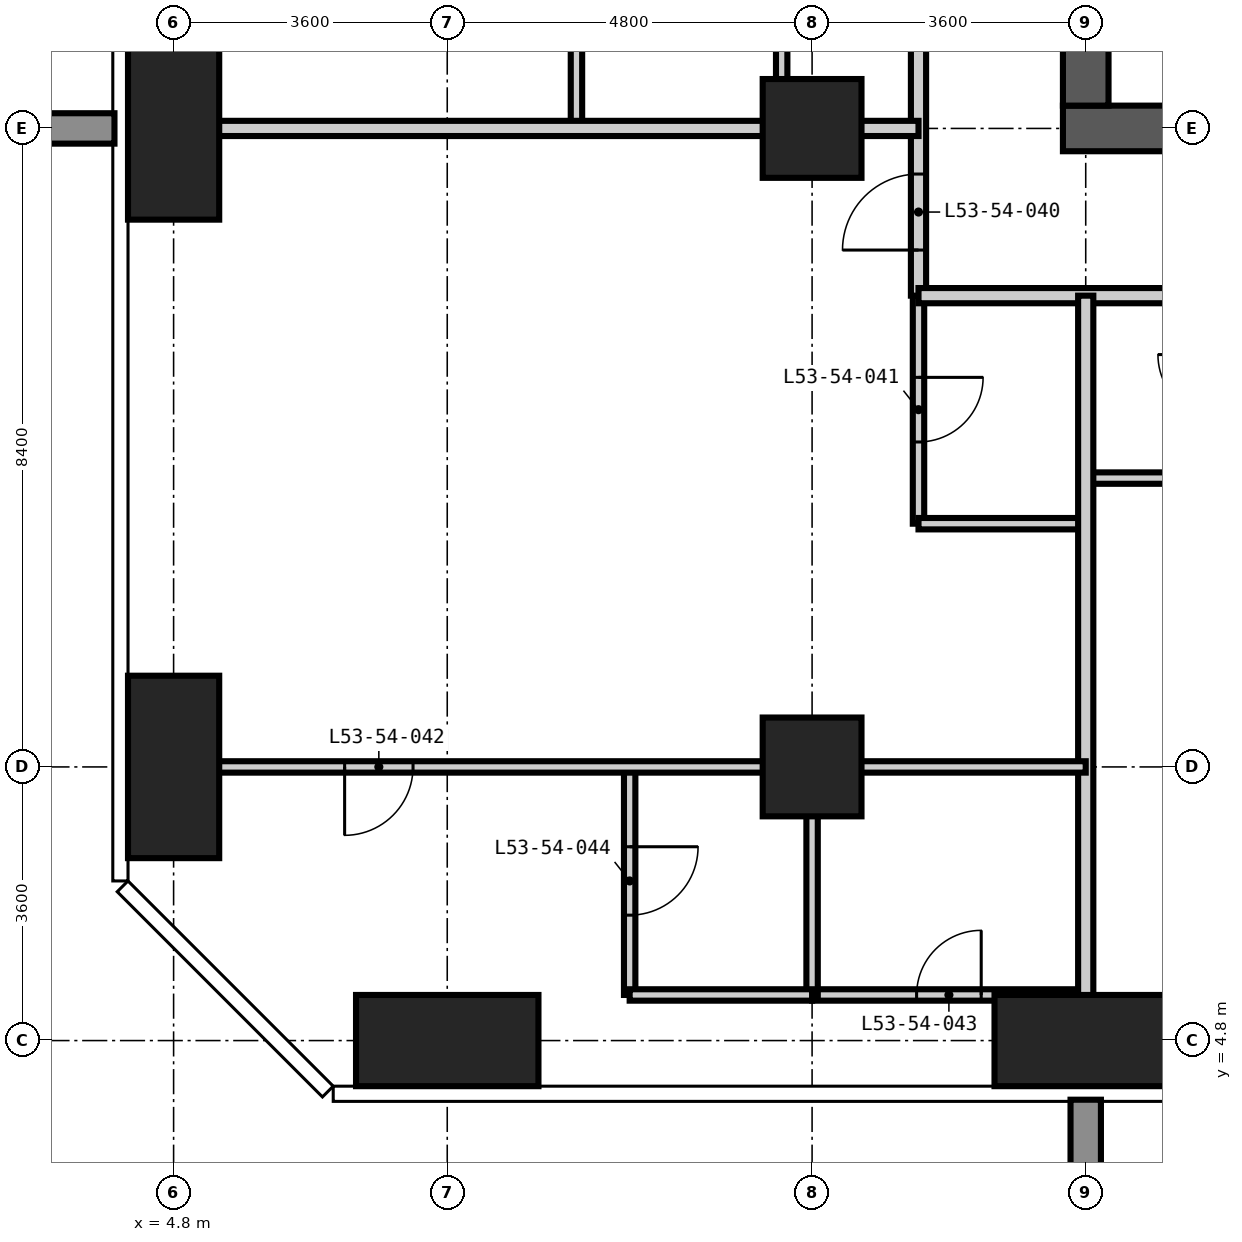
"""IFC4 building model, lengths in metres.
Left out: names, types, materials, properties, quantities, classifications, styles, units other than length and angle.
Written with IfcOpenShell. Run it as: python <this file> out.ifc"""

import sys

from ifc_helpers import new_model, si_unit, direction, frame, frame_2d, origin, origin_2d, place, context, subcontext, project, spatial, rectangle, extrude, element, fill, save


model = new_model("IFC4")
c1 = context("Model", 3, precision=1e-05, world=origin(), true_north=direction((0.0, 1.0)))
c2 = subcontext(c1, "Body", "Model", "MODEL_VIEW")
j1 = project(units=[si_unit("LENGTHUNIT", "METRE"), si_unit("PLANEANGLEUNIT", "RADIAN")], contexts=[c1])
p1 = place(None, origin())
s1 = spatial("IfcSite", under=j1, at=p1, CompositionType="ELEMENT")
p2 = place(p1, origin())
s2 = spatial("IfcBuilding", under=s1, at=p2, CompositionType="ELEMENT")
p3 = place(p2, frame((0.0, 0.0, 205.8)))
s3 = spatial("IfcBuildingStorey", under=s2, at=p3, CompositionType="ELEMENT", Elevation=205.8)
for number, where, z_axis, x_axis in (
    (1, (4.8, 8.4, -0.35), (0.0, 0.0, 1.0), (1.0, 0.0, 0.0)),
    (2, (4.8, 16.8, -0.35), (0.0, 0.0, 1.0), (1.0, 0.0, 0.0)),
):
    element("IfcColumn", number, at=place(p3, frame(where, z_axis=z_axis, x_axis=x_axis)), inside=s3, PredefinedType="COLUMN", context=c2, shape_type="SweptSolid", body=[
        extrude(rectangle(XDim=1.2, YDim=2.4, at=origin_2d()), origin(), (0.0, 0.0, 1.0), 3.6),
    ])
p4 = place(p3, frame((8.4, 4.8, -0.35), z_axis=(0.0, 0.0, 1.0), x_axis=(1.0, 0.0, 0.0)))
e3 = element("IfcColumn", 3, at=p4, inside=s3, PredefinedType="COLUMN", context=c2, shape_type="SweptSolid", body=[
    extrude(rectangle(XDim=2.4, YDim=1.2, at=origin_2d()), origin(), (0.0, 0.0, 1.0), 3.6),
])
for number, where, z_axis, x_axis in (
    (4, (13.2, 8.4, -0.35), (0.0, 0.0, 1.0), (1.0, 0.0, 0.0)),
    (5, (13.2, 16.8, -0.35), (0.0, 0.0, 1.0), (1.0, 0.0, 0.0)),
):
    element("IfcColumn", number, at=place(p3, frame(where, z_axis=z_axis, x_axis=x_axis)), inside=s3, PredefinedType="COLUMN", context=c2, shape_type="SweptSolid", body=[
        extrude(rectangle(XDim=1.3, YDim=1.3, at=origin_2d()), origin(), (0.0, 0.0, 1.0), 3.6),
    ])
p5 = place(p3, frame((16.8, 4.8, -0.35), z_axis=(0.0, 0.0, 1.0), x_axis=(1.0, 0.0, 0.0)))
e6 = element("IfcColumn", 6, at=p5, inside=s3, PredefinedType="COLUMN", context=c2, shape_type="SweptSolid", body=[
    extrude(rectangle(XDim=2.4, YDim=1.2, at=origin_2d()), origin(), (0.0, 0.0, 1.0), 3.6),
])
p6 = place(p3, frame((16.5, 16.8, -0.35), z_axis=(0.0, 0.0, 1.0), x_axis=(1.0, 0.0, 0.0)))
e7 = element("IfcWall", 7, at=p6, inside=s3, PredefinedType="SHEAR", context=c2, shape_type="SweptSolid", body=[
    extrude(rectangle(XDim=25.8, YDim=0.6, at=frame_2d((12.9, 0.0))), origin(), (0.0, 0.0, 1.0), 3.6),
])
p7 = place(p6, frame((12.4, 0.0, 0.35)))
e8 = element("IfcOpeningElement", 8, at=p7, cuts=e7, PredefinedType="OPENING", context=c2, shape_type="SweptSolid", body=[
    extrude(rectangle(XDim=1.0, YDim=2.1, at=frame_2d((0.5, 1.05))), frame((0.0, 0.31, 0.0), z_axis=(0.0, -1.0, 0.0), x_axis=(1.0, 0.0, 0.0)), (0.0, 0.0, 1.0), 0.62),
])
p8 = place(p6, frame((18.7, 0.0, 0.35)))
e9 = element("IfcOpeningElement", 9, at=p8, cuts=e7, PredefinedType="OPENING", context=c2, shape_type="SweptSolid", body=[
    extrude(rectangle(XDim=1.0, YDim=2.1, at=frame_2d((0.5, 1.05))), frame((0.0, 0.31, 0.0), z_axis=(0.0, -1.0, 0.0), x_axis=(1.0, 0.0, 0.0)), (0.0, 0.0, 1.0), 0.62),
])
p9 = place(p3, frame((16.8, 41.7, -0.35), z_axis=(0.0, 0.0, 1.0), x_axis=(0.0, -1.0, 0.0)))
e10 = element("IfcWall", 10, at=p9, inside=s3, PredefinedType="SHEAR", context=c2, shape_type="SweptSolid", body=[
    extrude(rectangle(XDim=24.6, YDim=0.6, at=frame_2d((12.3, 0.0))), origin(), (0.0, 0.0, 1.0), 3.6),
])
p10 = place(p9, frame((11.4, 0.0, 0.35)))
e11 = element("IfcOpeningElement", 11, at=p10, cuts=e10, PredefinedType="OPENING", context=c2, shape_type="SweptSolid", body=[
    extrude(rectangle(XDim=1.8, YDim=2.2, at=frame_2d((0.9, 1.1))), frame((0.0, 0.31, 0.0), z_axis=(0.0, -1.0, 0.0), x_axis=(1.0, 0.0, 0.0)), (0.0, 0.0, 1.0), 0.62),
])
p11 = place(p9, frame((20.2, 0.0, 0.35)))
e12 = element("IfcOpeningElement", 12, at=p11, cuts=e10, PredefinedType="OPENING", context=c2, shape_type="SweptSolid", body=[
    extrude(rectangle(XDim=1.0, YDim=2.1, at=frame_2d((0.5, 1.05))), frame((0.0, 0.31, 0.0), z_axis=(0.0, -1.0, 0.0), x_axis=(1.0, 0.0, 0.0)), (0.0, 0.0, 1.0), 0.62),
])
p12 = place(p9, frame((5.5, 0.0, 0.35)))
e13 = element("IfcOpeningElement", 13, at=p12, cuts=e10, PredefinedType="OPENING", context=c2, shape_type="SweptSolid", body=[
    extrude(rectangle(XDim=1.0, YDim=2.1, at=frame_2d((0.5, 1.05))), frame((0.0, 0.31, 0.0), z_axis=(0.0, -1.0, 0.0), x_axis=(1.0, 0.0, 0.0)), (0.0, 0.0, 1.0), 0.62),
])
for number, where, z_axis, x_axis in (
    (14, (10.1, 16.8, 0.0), (0.0, 0.0, 1.0), (0.0, 1.0, 0.0)),
    (15, (12.8, 16.8, 0.0), (0.0, 0.0, 1.0), (0.0, 1.0, 0.0)),
):
    element("IfcWall", number, at=place(p3, frame(where, z_axis=z_axis, x_axis=x_axis)), inside=s3, PredefinedType="PARTITIONING", context=c2, shape_type="SweptSolid", body=[
        extrude(rectangle(XDim=2.7, YDim=0.15, at=frame_2d((1.35, 0.0))), origin(), (0.0, 0.0, 1.0), 3.25),
    ])
p13 = place(p3, frame((14.6, 11.6, 0.0), z_axis=(0.0, 0.0, 1.0), x_axis=(0.0, 1.0, 0.0)))
e16 = element("IfcWall", 16, at=p13, inside=s3, PredefinedType="PARTITIONING", context=c2, shape_type="SweptSolid", body=[
    extrude(rectangle(XDim=3.0, YDim=0.15, at=frame_2d((1.5, 0.0))), origin(), (0.0, 0.0, 1.0), 3.25),
])
p14 = place(p13, frame((1.075, 0.0, 0.0)))
e17 = element("IfcOpeningElement", 17, at=p14, cuts=e16, PredefinedType="OPENING", context=c2, shape_type="SweptSolid", body=[
    extrude(rectangle(XDim=0.85, YDim=2.1, at=frame_2d((0.425, 1.05))), frame((0.0, 0.085, 0.0), z_axis=(0.0, -1.0, 0.0), x_axis=(1.0, 0.0, 0.0)), (0.0, 0.0, 1.0), 0.17),
])
p15 = place(p3, frame((13.2, 5.4, 0.0), z_axis=(0.0, 0.0, 1.0), x_axis=(1.0, 0.0, 0.0)))
e18 = element("IfcWall", 18, at=p15, inside=s3, PredefinedType="PARTITIONING", context=c2, shape_type="SweptSolid", body=[
    extrude(rectangle(XDim=3.6, YDim=0.15, at=frame_2d((1.8, 0.0))), origin(), (0.0, 0.0, 1.0), 3.25),
])
p16 = place(p15, frame((1.375, 0.0, 0.0)))
e19 = element("IfcOpeningElement", 19, at=p16, cuts=e18, PredefinedType="OPENING", context=c2, shape_type="SweptSolid", body=[
    extrude(rectangle(XDim=0.85, YDim=2.1, at=frame_2d((0.425, 1.05))), frame((0.0, 0.085, 0.0), z_axis=(0.0, -1.0, 0.0), x_axis=(1.0, 0.0, 0.0)), (0.0, 0.0, 1.0), 0.17),
])
p17 = place(p3, frame((14.6, 11.6, 0.0), z_axis=(0.0, 0.0, 1.0), x_axis=(1.0, 0.0, 0.0)))
e20 = element("IfcWall", 20, at=p17, inside=s3, PredefinedType="PARTITIONING", context=c2, shape_type="SweptSolid", body=[
    extrude(rectangle(XDim=2.2, YDim=0.15, at=frame_2d((1.1, 0.0))), origin(), (0.0, 0.0, 1.0), 3.25),
])
p18 = place(p3, frame((16.8, 12.2, 0.0), z_axis=(0.0, 0.0, 1.0), x_axis=(1.0, 0.0, 0.0)))
e21 = element("IfcWall", 21, at=p18, inside=s3, PredefinedType="PARTITIONING", context=c2, shape_type="SweptSolid", body=[
    extrude(rectangle(XDim=1.8, YDim=0.15, at=frame_2d((0.9, 0.0))), origin(), (0.0, 0.0, 1.0), 3.25),
])
p19 = place(p3, frame((14.6, 14.6, 0.0), z_axis=(0.0, 0.0, 1.0), x_axis=(0.0, 1.0, 0.0)))
e22 = element("IfcWall", 22, at=p19, inside=s3, PredefinedType="PARTITIONING", context=c2, shape_type="SweptSolid", body=[
    extrude(rectangle(XDim=13.0, YDim=0.2, at=frame_2d((6.5, 0.0))), origin(), (0.0, 0.0, 1.0), 3.25),
])
p20 = place(p19, frame((3.8, 0.0, 0.0)))
e23 = element("IfcOpeningElement", 23, at=p20, cuts=e22, PredefinedType="OPENING", context=c2, shape_type="SweptSolid", body=[
    extrude(rectangle(XDim=1.0, YDim=2.2, at=frame_2d((0.5, 1.1))), frame((0.0, 0.11, 0.0), z_axis=(0.0, -1.0, 0.0), x_axis=(1.0, 0.0, 0.0)), (0.0, 0.0, 1.0), 0.22),
])
p21 = place(p19, frame((8.0, 0.0, 0.0)))
e24 = element("IfcOpeningElement", 24, at=p21, cuts=e22, PredefinedType="OPENING", context=c2, shape_type="SweptSolid", body=[
    extrude(rectangle(XDim=1.0, YDim=2.2, at=frame_2d((0.5, 1.1))), frame((0.0, 0.11, 0.0), z_axis=(0.0, -1.0, 0.0), x_axis=(1.0, 0.0, 0.0)), (0.0, 0.0, 1.0), 0.22),
])
p22 = place(p19, frame((0.6, 0.0, 0.0)))
e25 = element("IfcOpeningElement", 25, at=p22, cuts=e22, PredefinedType="OPENING", context=c2, shape_type="SweptSolid", body=[
    extrude(rectangle(XDim=1.0, YDim=2.2, at=frame_2d((0.5, 1.1))), frame((0.0, 0.11, 0.0), z_axis=(0.0, -1.0, 0.0), x_axis=(1.0, 0.0, 0.0)), (0.0, 0.0, 1.0), 0.22),
])
p23 = place(p3, frame((44.8, 14.6, 0.0), z_axis=(0.0, 0.0, 1.0), x_axis=(-1.0, 0.0, 0.0)))
e26 = element("IfcWall", 26, at=p23, inside=s3, PredefinedType="PARTITIONING", context=c2, shape_type="SweptSolid", body=[
    extrude(rectangle(XDim=30.2, YDim=0.2, at=frame_2d((15.1, 0.0))), origin(), (0.0, 0.0, 1.0), 3.25),
])
p24 = place(p23, frame((24.5, 0.0, 0.0)))
e27 = element("IfcOpeningElement", 27, at=p24, cuts=e26, PredefinedType="OPENING", context=c2, shape_type="SweptSolid", body=[
    extrude(rectangle(XDim=1.0, YDim=2.2, at=frame_2d((0.5, 1.1))), frame((0.0, 0.11, 0.0), z_axis=(0.0, -1.0, 0.0), x_axis=(1.0, 0.0, 0.0)), (0.0, 0.0, 1.0), 0.22),
])
p25 = place(p23, frame((12.8, 0.0, 0.0)))
e28 = element("IfcOpeningElement", 28, at=p25, cuts=e26, PredefinedType="OPENING", context=c2, shape_type="SweptSolid", body=[
    extrude(rectangle(XDim=1.0, YDim=2.2, at=frame_2d((0.5, 1.1))), frame((0.0, 0.11, 0.0), z_axis=(0.0, -1.0, 0.0), x_axis=(1.0, 0.0, 0.0)), (0.0, 0.0, 1.0), 0.22),
])
p26 = place(p23, frame((6.5, 0.0, 0.0)))
e29 = element("IfcOpeningElement", 29, at=p26, cuts=e26, PredefinedType="OPENING", context=c2, shape_type="SweptSolid", body=[
    extrude(rectangle(XDim=1.0, YDim=2.2, at=frame_2d((0.5, 1.1))), frame((0.0, 0.11, 0.0), z_axis=(0.0, -1.0, 0.0), x_axis=(1.0, 0.0, 0.0)), (0.0, 0.0, 1.0), 0.22),
])
for number, where, z_axis, x_axis in (
    (30, (16.8, 4.182, 0.0), (0.0, 0.0, 1.0), (0.0, 1.0, 0.0)),
    (31, (4.182, 16.8, 0.0), (0.0, 0.0, 1.0), (1.0, 0.0, 0.0)),
):
    element("IfcWall", number, at=place(p3, frame(where, z_axis=z_axis, x_axis=x_axis)), inside=s3, PredefinedType="PARTITIONING", context=c2, shape_type="SweptSolid", body=[
        extrude(rectangle(XDim=10.418, YDim=0.2, at=frame_2d((5.209, 0.0))), origin(), (0.0, 0.0, 1.0), 3.25),
    ])
p27 = place(p3, frame((10.8, 5.4, 0.0), z_axis=(0.0, 0.0, 1.0), x_axis=(0.0, 1.0, 0.0)))
e32 = element("IfcWall", 32, at=p27, inside=s3, PredefinedType="PARTITIONING", context=c2, shape_type="SweptSolid", body=[
    extrude(rectangle(XDim=3.0, YDim=0.15, at=frame_2d((1.5, 0.0))), origin(), (0.0, 0.0, 1.0), 3.25),
])
p28 = place(p27, frame((1.05, 0.0, 0.0)))
e33 = element("IfcOpeningElement", 33, at=p28, cuts=e32, PredefinedType="OPENING", context=c2, shape_type="SweptSolid", body=[
    extrude(rectangle(XDim=0.9, YDim=2.1, at=frame_2d((0.45, 1.05))), frame((0.0, 0.085, 0.0), z_axis=(0.0, -1.0, 0.0), x_axis=(1.0, 0.0, 0.0)), (0.0, 0.0, 1.0), 0.17),
])
p29 = place(p3, frame((13.2, 5.4, 0.0), z_axis=(0.0, 0.0, 1.0), x_axis=(0.0, 1.0, 0.0)))
e34 = element("IfcWall", 34, at=p29, inside=s3, PredefinedType="PARTITIONING", context=c2, shape_type="SweptSolid", body=[
    extrude(rectangle(XDim=3.0, YDim=0.15, at=frame_2d((1.5, 0.0))), origin(), (0.0, 0.0, 1.0), 3.25),
])
p30 = place(p3, frame((10.8, 5.4, 0.0), z_axis=(0.0, 0.0, 1.0), x_axis=(1.0, 0.0, 0.0)))
e35 = element("IfcWall", 35, at=p30, inside=s3, PredefinedType="PARTITIONING", context=c2, shape_type="SweptSolid", body=[
    extrude(rectangle(XDim=2.4, YDim=0.15, at=frame_2d((1.2, 0.0))), origin(), (0.0, 0.0, 1.0), 3.25),
])
p31 = place(p3, frame((4.182, 8.4, 0.0), z_axis=(0.0, 0.0, 1.0), x_axis=(1.0, 0.0, 0.0)))
e36 = element("IfcWall", 36, at=p31, inside=s3, PredefinedType="PARTITIONING", context=c2, shape_type="SweptSolid", body=[
    extrude(rectangle(XDim=12.618, YDim=0.15, at=frame_2d((6.309, 0.0))), origin(), (0.0, 0.0, 1.0), 3.25),
])
p32 = place(p31, frame((2.868, 0.0, 0.0)))
e37 = element("IfcOpeningElement", 37, at=p32, cuts=e36, PredefinedType="OPENING", context=c2, shape_type="SweptSolid", body=[
    extrude(rectangle(XDim=0.9, YDim=2.1, at=frame_2d((0.45, 1.05))), frame((0.0, 0.085, 0.0), z_axis=(0.0, -1.0, 0.0), x_axis=(1.0, 0.0, 0.0)), (0.0, 0.0, 1.0), 0.17),
])
p33 = place(p22, origin())
e38 = element("IfcDoor", 38, at=p33, inside=s3, OperationType="SINGLE_SWING_LEFT", PredefinedType="DOOR", context=c2, shape_type="SweptSolid", body=[
    extrude(rectangle(XDim=1.0, YDim=2.2, at=frame_2d((0.5, 1.1))), frame((0.0, 0.025, 0.0), z_axis=(0.0, -1.0, 0.0), x_axis=(1.0, 0.0, 0.0)), (0.0, 0.0, 1.0), 0.05),
])
fill(e25, e38)
p34 = place(p14, frame((0.85, 0.0, 0.0), z_axis=(0.0, 0.0, 1.0), x_axis=(-1.0, 0.0, 0.0)))
e39 = element("IfcDoor", 39, at=p34, inside=s3, OperationType="SINGLE_SWING_LEFT", PredefinedType="DOOR", context=c2, shape_type="SweptSolid", body=[
    extrude(rectangle(XDim=0.85, YDim=2.1, at=frame_2d((0.425, 1.05))), frame((0.0, 0.025, 0.0), z_axis=(0.0, -1.0, 0.0), x_axis=(1.0, 0.0, 0.0)), (0.0, 0.0, 1.0), 0.05),
])
fill(e17, e39)
p35 = place(p32, frame((0.9, 0.0, 0.0), z_axis=(0.0, 0.0, 1.0), x_axis=(-1.0, 0.0, 0.0)))
e40 = element("IfcDoor", 40, at=p35, inside=s3, OperationType="SINGLE_SWING_RIGHT", PredefinedType="DOOR", context=c2, shape_type="SweptSolid", body=[
    extrude(rectangle(XDim=0.9, YDim=2.1, at=frame_2d((0.45, 1.05))), frame((0.0, 0.025, 0.0), z_axis=(0.0, -1.0, 0.0), x_axis=(1.0, 0.0, 0.0)), (0.0, 0.0, 1.0), 0.05),
])
fill(e37, e40)
p36 = place(p16, origin())
e41 = element("IfcDoor", 41, at=p36, inside=s3, OperationType="SINGLE_SWING_RIGHT", PredefinedType="DOOR", context=c2, shape_type="SweptSolid", body=[
    extrude(rectangle(XDim=0.85, YDim=2.1, at=frame_2d((0.425, 1.05))), frame((0.0, 0.025, 0.0), z_axis=(0.0, -1.0, 0.0), x_axis=(1.0, 0.0, 0.0)), (0.0, 0.0, 1.0), 0.05),
])
fill(e19, e41)
p37 = place(p28, frame((0.9, 0.0, 0.0), z_axis=(0.0, 0.0, 1.0), x_axis=(-1.0, 0.0, 0.0)))
e42 = element("IfcDoor", 42, at=p37, inside=s3, OperationType="SINGLE_SWING_LEFT", PredefinedType="DOOR", context=c2, shape_type="SweptSolid", body=[
    extrude(rectangle(XDim=0.9, YDim=2.1, at=frame_2d((0.45, 1.05))), frame((0.0, 0.025, 0.0), z_axis=(0.0, -1.0, 0.0), x_axis=(1.0, 0.0, 0.0)), (0.0, 0.0, 1.0), 0.05),
])
fill(e33, e42)
save(model, sys.argv[1])
